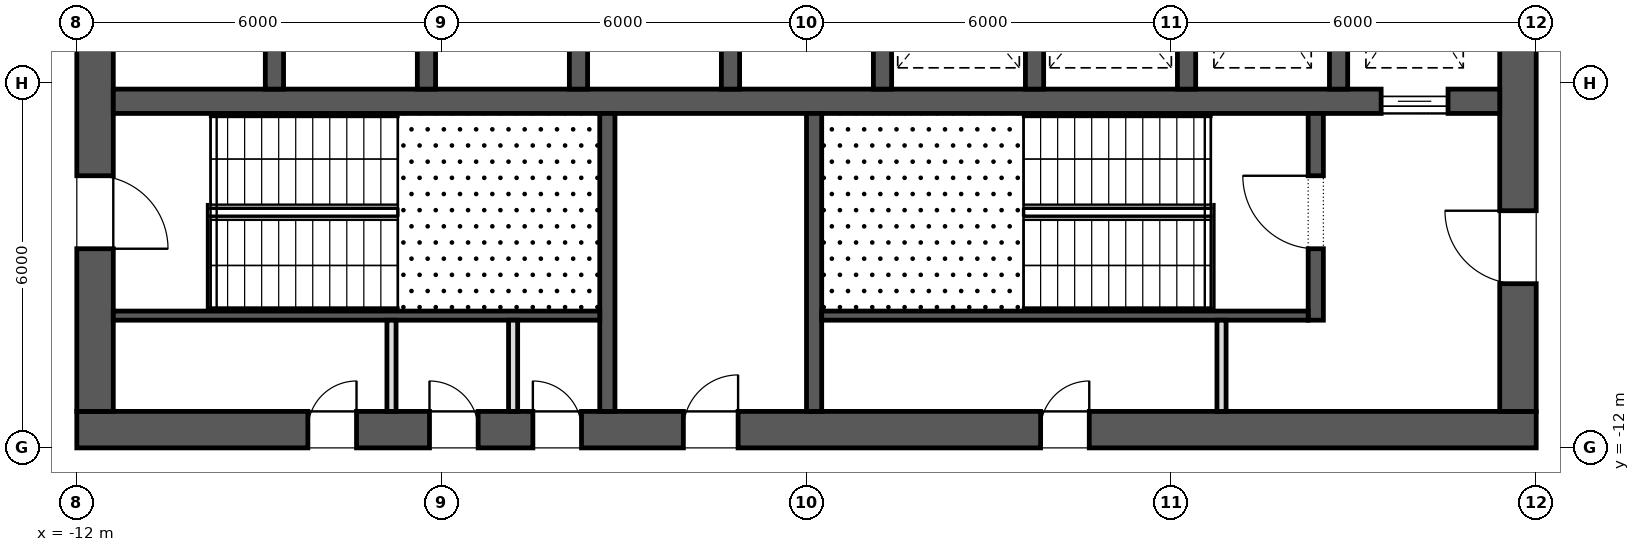
"""IFC4 building model, lengths in metres.
Left out: names, types, materials, properties, quantities, classifications, styles, units other than length and angle.
Written with IfcOpenShell. Run it as: python <this file> out.ifc"""

import sys

from ifc_helpers import new_model, si_unit, direction, frame, frame_2d, origin, place, context, subcontext, project, spatial, rectangle, extrude, element, fill, save


model = new_model("IFC4")
c1 = context("Model", 3, precision=1e-05, world=origin(), true_north=direction((0.0, 1.0)))
c2 = subcontext(c1, "Body", "Model", "MODEL_VIEW")
j1 = project(units=[si_unit("LENGTHUNIT", "METRE"), si_unit("PLANEANGLEUNIT", "RADIAN")], contexts=[c1])
p1 = place(None, origin())
s1 = spatial("IfcSite", under=j1, at=p1, CompositionType="ELEMENT")
p2 = place(p1, origin())
s2 = spatial("IfcBuilding", under=s1, at=p2, CompositionType="ELEMENT")
p3 = place(p2, frame((0.0, 0.0, 69.7)))
s3 = spatial("IfcBuildingStorey", under=s2, at=p3, CompositionType="ELEMENT", Elevation=69.7)
p4 = place(p3, frame((-12.0, -11.7, 0.0), z_axis=(0.0, 0.0, 1.0), x_axis=(1.0, 0.0, 0.0)))
e1 = element("IfcWall", 1, at=p4, inside=s3, PredefinedType="SHEAR", context=c2, shape_type="SweptSolid", body=[
    extrude(rectangle(XDim=24.0, YDim=0.6, at=frame_2d((12.0, 0.0))), origin(), (0.0, 0.0, 1.0), 4.2),
])
p5 = place(p4, frame((9.975, 0.0, 0.0)))
e2 = element("IfcOpeningElement", 2, at=p5, cuts=e1, PredefinedType="OPENING", context=c2, shape_type="SweptSolid", body=[
    extrude(rectangle(XDim=0.9, YDim=2.1, at=frame_2d((0.45, 1.05))), frame((0.0, 0.312, 0.0), z_axis=(0.0, -1.0, 0.0), x_axis=(1.0, 0.0, 0.0)), (0.0, 0.0, 1.0), 0.624),
])
p6 = place(p4, frame((3.8, 0.0, 0.0)))
e3 = element("IfcOpeningElement", 3, at=p6, cuts=e1, PredefinedType="OPENING", context=c2, shape_type="SweptSolid", body=[
    extrude(rectangle(XDim=0.8, YDim=2.1, at=frame_2d((0.4, 1.05))), frame((0.0, 0.312, 0.0), z_axis=(0.0, -1.0, 0.0), x_axis=(1.0, 0.0, 0.0)), (0.0, 0.0, 1.0), 0.624),
])
p7 = place(p4, frame((5.8, 0.0, 0.0)))
e4 = element("IfcOpeningElement", 4, at=p7, cuts=e1, PredefinedType="OPENING", context=c2, shape_type="SweptSolid", body=[
    extrude(rectangle(XDim=0.8, YDim=2.1, at=frame_2d((0.4, 1.05))), frame((0.0, 0.312, 0.0), z_axis=(0.0, -1.0, 0.0), x_axis=(1.0, 0.0, 0.0)), (0.0, 0.0, 1.0), 0.624),
])
p8 = place(p4, frame((7.5, 0.0, 0.0)))
e5 = element("IfcOpeningElement", 5, at=p8, cuts=e1, PredefinedType="OPENING", context=c2, shape_type="SweptSolid", body=[
    extrude(rectangle(XDim=0.8, YDim=2.1, at=frame_2d((0.4, 1.05))), frame((0.0, 0.312, 0.0), z_axis=(0.0, -1.0, 0.0), x_axis=(1.0, 0.0, 0.0)), (0.0, 0.0, 1.0), 0.624),
])
p9 = place(p4, frame((15.85, 0.0, 0.0)))
e6 = element("IfcOpeningElement", 6, at=p9, cuts=e1, PredefinedType="OPENING", context=c2, shape_type="SweptSolid", body=[
    extrude(rectangle(XDim=0.8, YDim=2.1, at=frame_2d((0.4, 1.05))), frame((0.0, 0.312, 0.0), z_axis=(0.0, -1.0, 0.0), x_axis=(1.0, 0.0, 0.0)), (0.0, 0.0, 1.0), 0.624),
])
p10 = place(p3, frame((11.7, -11.4, 0.0), z_axis=(0.0, 0.0, 1.0), x_axis=(0.0, 1.0, 0.0)))
e7 = element("IfcWall", 7, at=p10, inside=s3, PredefinedType="SHEAR", context=c2, shape_type="SweptSolid", body=[
    extrude(rectangle(XDim=22.8, YDim=0.6, at=frame_2d((11.4, 0.0))), origin(), (0.0, 0.0, 1.0), 4.2),
])
p11 = place(p10, frame((10.2, 0.0, 0.0)))
e8 = element("IfcOpeningElement", 8, at=p11, cuts=e7, PredefinedType="OPENING", context=c2, shape_type="SweptSolid", body=[
    extrude(rectangle(XDim=2.4, YDim=2.1, at=frame_2d((1.2, 1.05))), frame((0.0, 0.312, 0.0), z_axis=(0.0, -1.0, 0.0), x_axis=(1.0, 0.0, 0.0)), (0.0, 0.0, 1.0), 0.624),
])
p12 = place(p10, frame((19.5, 0.0, 0.0)))
e9 = element("IfcOpeningElement", 9, at=p12, cuts=e7, PredefinedType="OPENING", context=c2, shape_type="SweptSolid", body=[
    extrude(rectangle(XDim=1.2, YDim=2.1, at=frame_2d((0.6, 1.05))), frame((0.0, 0.312, 0.0), z_axis=(0.0, -1.0, 0.0), x_axis=(1.0, 0.0, 0.0)), (0.0, 0.0, 1.0), 0.624),
])
p13 = place(p10, frame((2.1, 0.0, 0.0)))
e10 = element("IfcOpeningElement", 10, at=p13, cuts=e7, PredefinedType="OPENING", context=c2, shape_type="SweptSolid", body=[
    extrude(rectangle(XDim=1.2, YDim=2.1, at=frame_2d((0.6, 1.05))), frame((0.0, 0.312, 0.0), z_axis=(0.0, -1.0, 0.0), x_axis=(1.0, 0.0, 0.0)), (0.0, 0.0, 1.0), 0.624),
])
p14 = place(p3, frame((-11.7, -11.4, 0.0), z_axis=(0.0, 0.0, 1.0), x_axis=(0.0, 1.0, 0.0)))
e11 = element("IfcWall", 11, at=p14, inside=s3, PredefinedType="SHEAR", context=c2, shape_type="SweptSolid", body=[
    extrude(rectangle(XDim=22.8, YDim=0.6, at=frame_2d((11.4, 0.0))), origin(), (0.0, 0.0, 1.0), 4.2),
])
p15 = place(p14, frame((10.2, 0.0, 0.0)))
e12 = element("IfcOpeningElement", 12, at=p15, cuts=e11, PredefinedType="OPENING", context=c2, shape_type="SweptSolid", body=[
    extrude(rectangle(XDim=2.4, YDim=2.1, at=frame_2d((1.2, 1.05))), frame((0.0, 0.312, 0.0), z_axis=(0.0, -1.0, 0.0), x_axis=(1.0, 0.0, 0.0)), (0.0, 0.0, 1.0), 0.624),
])
p16 = place(p14, frame((18.925, 0.0, 0.0)))
e13 = element("IfcOpeningElement", 13, at=p16, cuts=e11, PredefinedType="OPENING", context=c2, shape_type="SweptSolid", body=[
    extrude(rectangle(XDim=1.2, YDim=2.1, at=frame_2d((0.6, 1.05))), frame((0.0, 0.312, 0.0), z_axis=(0.0, -1.0, 0.0), x_axis=(1.0, 0.0, 0.0)), (0.0, 0.0, 1.0), 0.624),
])
p17 = place(p14, frame((2.675, 0.0, 0.0)))
e14 = element("IfcOpeningElement", 14, at=p17, cuts=e11, PredefinedType="OPENING", context=c2, shape_type="SweptSolid", body=[
    extrude(rectangle(XDim=1.2, YDim=2.1, at=frame_2d((0.6, 1.05))), frame((0.0, 0.312, 0.0), z_axis=(0.0, -1.0, 0.0), x_axis=(1.0, 0.0, 0.0)), (0.0, 0.0, 1.0), 0.624),
])
p18 = place(p3, frame((-11.4, -6.3, 0.0), z_axis=(0.0, 0.0, 1.0), x_axis=(1.0, 0.0, 0.0)))
e15 = element("IfcWall", 15, at=p18, inside=s3, PredefinedType="SHEAR", context=c2, shape_type="SweptSolid", body=[
    extrude(rectangle(XDim=22.8, YDim=0.4, at=frame_2d((11.4, 0.0))), origin(), (0.0, 0.0, 1.0), 4.2),
])
p19 = place(p18, frame((20.85, 0.0, 0.0)))
e16 = element("IfcOpeningElement", 16, at=p19, cuts=e15, PredefinedType="OPENING", context=c2, shape_type="SweptSolid", body=[
    extrude(rectangle(XDim=1.1, YDim=2.1, at=frame_2d((0.55, 1.05))), frame((0.0, 0.212, 0.0), z_axis=(0.0, -1.0, 0.0), x_axis=(1.0, 0.0, 0.0)), (0.0, 0.0, 1.0), 0.424),
])
for number, where, z_axis, x_axis in (
    (17, (-8.75, -6.1, 0.0), (0.0, 0.0, 1.0), (0.0, 1.0, 0.0)),
    (18, (-6.25, -6.1, 0.0), (0.0, 0.0, 1.0), (0.0, 1.0, 0.0)),
    (19, (-3.75, -6.1, 0.0), (0.0, 0.0, 1.0), (0.0, 1.0, 0.0)),
    (20, (-1.25, -6.1, 0.0), (0.0, 0.0, 1.0), (0.0, 1.0, 0.0)),
    (21, (1.25, -6.1, 0.0), (0.0, 0.0, 1.0), (0.0, 1.0, 0.0)),
    (22, (3.75, -6.1, 0.0), (0.0, 0.0, 1.0), (0.0, 1.0, 0.0)),
    (23, (6.25, -6.1, 0.0), (0.0, 0.0, 1.0), (0.0, 1.0, 0.0)),
    (24, (8.75, -6.1, 0.0), (0.0, 0.0, 1.0), (0.0, 1.0, 0.0)),
):
    element("IfcWall", number, at=place(p3, frame(where, z_axis=z_axis, x_axis=x_axis)), inside=s3, PredefinedType="SHEAR", context=c2, shape_type="SweptSolid", body=[
        extrude(rectangle(XDim=2.9, YDim=0.3, at=frame_2d((1.45, 0.0))), origin(), (0.0, 0.0, 1.0), 4.2),
    ])
for number, where, z_axis, x_axis in (
    (25, (-3.275, -11.4, 0.0), (0.0, 0.0, 1.0), (0.0, 1.0, 0.0)),
    (26, (0.125, -11.4, 0.0), (0.0, 0.0, 1.0), (0.0, 1.0, 0.0)),
):
    element("IfcWall", number, at=place(p3, frame(where, z_axis=z_axis, x_axis=x_axis)), inside=s3, PredefinedType="SHEAR", context=c2, shape_type="SweptSolid", body=[
        extrude(rectangle(XDim=4.9, YDim=0.25, at=frame_2d((2.45, 0.0))), origin(), (0.0, 0.0, 1.0), 3.9),
    ])
p20 = place(p3, frame((8.375, -9.9, 0.0), z_axis=(0.0, 0.0, 1.0), x_axis=(0.0, 1.0, 0.0)))
e27 = element("IfcWall", 27, at=p20, inside=s3, PredefinedType="SHEAR", context=c2, shape_type="SweptSolid", body=[
    extrude(rectangle(XDim=3.4, YDim=0.25, at=frame_2d((1.7, 0.0))), origin(), (0.0, 0.0, 1.0), 3.9),
])
p21 = place(p20, frame((1.175, 0.0, 0.0)))
e28 = element("IfcOpeningElement", 28, at=p21, cuts=e27, PredefinedType="OPENING", context=c2, shape_type="SweptSolid", body=[
    extrude(rectangle(XDim=1.2, YDim=2.1, at=frame_2d((0.6, 1.05))), frame((0.0, 0.137, 0.0), z_axis=(0.0, -1.0, 0.0), x_axis=(1.0, 0.0, 0.0)), (0.0, 0.0, 1.0), 0.274),
])
for number, where, z_axis, x_axis in (
    (29, (-11.4, -9.825, 0.0), (0.0, 0.0, 1.0), (1.0, 0.0, 0.0)),
    (30, (0.25, -9.825, 0.0), (0.0, 0.0, 1.0), (1.0, 0.0, 0.0)),
):
    element("IfcWall", number, at=place(p3, frame(where, z_axis=z_axis, x_axis=x_axis)), inside=s3, PredefinedType="SHEAR", context=c2, shape_type="SweptSolid", body=[
        extrude(rectangle(XDim=8.0, YDim=0.15, at=frame_2d((4.0, 0.0))), origin(), (0.0, 0.0, 1.0), 3.9),
    ])
for number, where, z_axis, x_axis in (
    (31, (-6.825, -11.4, 0.0), (0.0, 0.0, 1.0), (0.0, 1.0, 0.0)),
    (32, (-4.825, -11.4, 0.0), (0.0, 0.0, 1.0), (0.0, 1.0, 0.0)),
    (33, (6.825, -11.4, 0.0), (0.0, 0.0, 1.0), (0.0, 1.0, 0.0)),
):
    element("IfcWall", number, at=place(p3, frame(where, z_axis=z_axis, x_axis=x_axis)), inside=s3, PredefinedType="PARTITIONING", context=c2, shape_type="SweptSolid", body=[
        extrude(rectangle(XDim=1.5, YDim=0.15, at=frame_2d((0.75, 0.0))), origin(), (0.0, 0.0, 1.0), 3.9),
    ])
p22 = place(p19, origin())
e34 = element("IfcDoor", 34, at=p22, inside=s3, OperationType="SLIDING_TO_LEFT", PredefinedType="DOOR", context=c2, shape_type="SweptSolid", body=[
    extrude(rectangle(XDim=1.1, YDim=2.1, at=frame_2d((0.55, 1.05))), frame((0.0, 0.025, 0.0), z_axis=(0.0, -1.0, 0.0), x_axis=(1.0, 0.0, 0.0)), (0.0, 0.0, 1.0), 0.05),
])
fill(e16, e34)
p23 = place(p17, frame((1.2, 0.0, 0.0), z_axis=(0.0, 0.0, 1.0), x_axis=(-1.0, 0.0, 0.0)))
e35 = element("IfcDoor", 35, at=p23, inside=s3, OperationType="SINGLE_SWING_LEFT", PredefinedType="DOOR", context=c2, shape_type="SweptSolid", body=[
    extrude(rectangle(XDim=1.2, YDim=2.1, at=frame_2d((0.6, 1.05))), frame((0.0, 0.025, 0.0), z_axis=(0.0, -1.0, 0.0), x_axis=(1.0, 0.0, 0.0)), (0.0, 0.0, 1.0), 0.05),
])
fill(e14, e35)
p24 = place(p21, origin())
e36 = element("IfcDoor", 36, at=p24, inside=s3, OperationType="SINGLE_SWING_LEFT", PredefinedType="DOOR", context=c2, shape_type="SweptSolid", body=[
    extrude(rectangle(XDim=1.2, YDim=2.1, at=frame_2d((0.6, 1.05))), frame((0.0, 0.025, 0.0), z_axis=(0.0, -1.0, 0.0), x_axis=(1.0, 0.0, 0.0)), (0.0, 0.0, 1.0), 0.05),
])
fill(e28, e36)
p25 = place(p13, origin())
e37 = element("IfcDoor", 37, at=p25, inside=s3, OperationType="SINGLE_SWING_LEFT", PredefinedType="DOOR", context=c2, shape_type="SweptSolid", body=[
    extrude(rectangle(XDim=1.2, YDim=2.1, at=frame_2d((0.6, 1.05))), frame((0.0, 0.025, 0.0), z_axis=(0.0, -1.0, 0.0), x_axis=(1.0, 0.0, 0.0)), (0.0, 0.0, 1.0), 0.05),
])
fill(e10, e37)
p26 = place(p5, origin())
e38 = element("IfcDoor", 38, at=p26, inside=s3, OperationType="SINGLE_SWING_LEFT", PredefinedType="DOOR", context=c2, shape_type="SweptSolid", body=[
    extrude(rectangle(XDim=0.9, YDim=2.1, at=frame_2d((0.45, 1.05))), frame((0.0, 0.025, 0.0), z_axis=(0.0, -1.0, 0.0), x_axis=(1.0, 0.0, 0.0)), (0.0, 0.0, 1.0), 0.05),
])
fill(e2, e38)
p27 = place(p6, origin())
e39 = element("IfcDoor", 39, at=p27, inside=s3, OperationType="SINGLE_SWING_LEFT", PredefinedType="DOOR", context=c2, shape_type="SweptSolid", body=[
    extrude(rectangle(XDim=0.8, YDim=2.1, at=frame_2d((0.4, 1.05))), frame((0.0, 0.025, 0.0), z_axis=(0.0, -1.0, 0.0), x_axis=(1.0, 0.0, 0.0)), (0.0, 0.0, 1.0), 0.05),
])
fill(e3, e39)
p28 = place(p7, origin())
e40 = element("IfcDoor", 40, at=p28, inside=s3, OperationType="SINGLE_SWING_RIGHT", PredefinedType="DOOR", context=c2, shape_type="SweptSolid", body=[
    extrude(rectangle(XDim=0.8, YDim=2.1, at=frame_2d((0.4, 1.05))), frame((0.0, 0.025, 0.0), z_axis=(0.0, -1.0, 0.0), x_axis=(1.0, 0.0, 0.0)), (0.0, 0.0, 1.0), 0.05),
])
fill(e4, e40)
p29 = place(p8, origin())
e41 = element("IfcDoor", 41, at=p29, inside=s3, OperationType="SINGLE_SWING_RIGHT", PredefinedType="DOOR", context=c2, shape_type="SweptSolid", body=[
    extrude(rectangle(XDim=0.8, YDim=2.1, at=frame_2d((0.4, 1.05))), frame((0.0, 0.025, 0.0), z_axis=(0.0, -1.0, 0.0), x_axis=(1.0, 0.0, 0.0)), (0.0, 0.0, 1.0), 0.05),
])
fill(e5, e41)
p30 = place(p9, origin())
e42 = element("IfcDoor", 42, at=p30, inside=s3, OperationType="SINGLE_SWING_LEFT", PredefinedType="DOOR", context=c2, shape_type="SweptSolid", body=[
    extrude(rectangle(XDim=0.8, YDim=2.1, at=frame_2d((0.4, 1.05))), frame((0.0, 0.025, 0.0), z_axis=(0.0, -1.0, 0.0), x_axis=(1.0, 0.0, 0.0)), (0.0, 0.0, 1.0), 0.05),
])
fill(e6, e42)
save(model, sys.argv[1])
